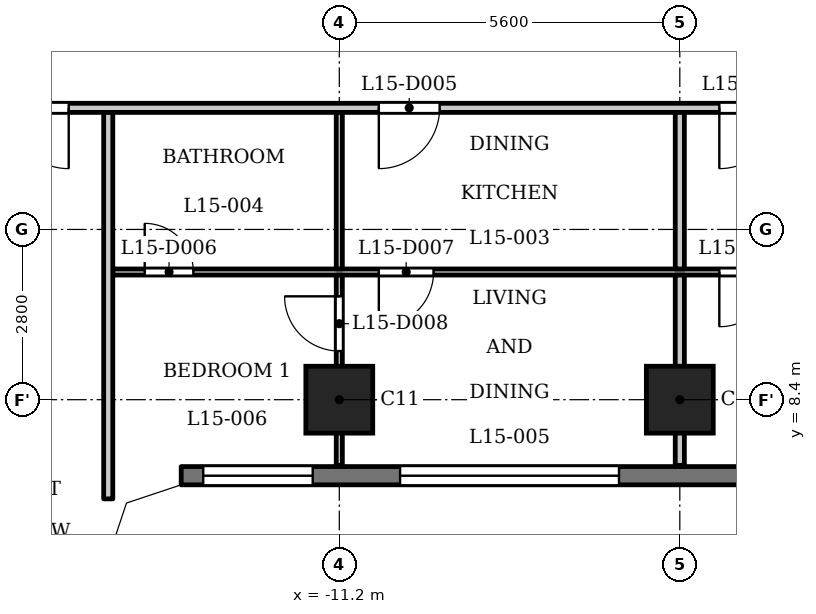
"""IFC4 building model, lengths in metres.
Left out: names, types, materials, properties, quantities, classifications, styles, units other than length and angle.
Written with IfcOpenShell. Run it as: python <this file> out.ifc"""

import sys

from ifc_helpers import new_model, si_unit, direction, frame, frame_2d, origin, origin_2d, place, context, subcontext, project, spatial, polyline, rectangle, outline, extrude, element, fill, save


model = new_model("IFC4")
c1 = context("Model", 3, precision=1e-05, world=origin(), true_north=direction((0.0, 1.0)))
c2 = subcontext(c1, "Body", "Model", "MODEL_VIEW")
j1 = project(units=[si_unit("LENGTHUNIT", "METRE"), si_unit("PLANEANGLEUNIT", "RADIAN")], contexts=[c1])
p1 = place(None, origin())
s1 = spatial("IfcSite", under=j1, at=p1, CompositionType="ELEMENT")
p2 = place(p1, origin())
s2 = spatial("IfcBuilding", under=s1, at=p2, CompositionType="ELEMENT")
p3 = place(p2, frame((0.0, 0.0, 62.0)))
s3 = spatial("IfcBuildingStorey", under=s2, at=p3, CompositionType="ELEMENT", Elevation=62.0)
for number, where, z_axis, x_axis in (
    (1, (-11.2, 8.4, 0.0), (0.0, 0.0, 1.0), (1.0, 0.0, 0.0)),
    (2, (-5.6, 8.4, 0.0), (0.0, 0.0, 1.0), (1.0, 0.0, 0.0)),
):
    element("IfcColumn", number, at=place(p3, frame(where, z_axis=z_axis, x_axis=x_axis)), inside=s3, PredefinedType="COLUMN", context=c2, shape_type="SweptSolid", body=[
        extrude(rectangle(XDim=1.1, YDim=1.1, at=origin_2d()), origin(), (0.0, 0.0, 1.0), 3.5),
    ])
p4 = place(p3, frame((-13.8, 7.15, 0.0), z_axis=(0.0, 0.0, 1.0), x_axis=(1.0, 0.0, 0.0)))
e3 = element("IfcWall", 3, at=p4, inside=s3, PredefinedType="SOLIDWALL", context=c2, shape_type="SweptSolid", body=[
    extrude(rectangle(XDim=27.6, YDim=0.3, at=frame_2d((13.8, 0.0))), origin(), (0.0, 0.0, 1.0), 3.2),
])
p5 = place(p4, frame((0.363, 0.0, 0.9)))
e4 = element("IfcOpeningElement", 4, at=p5, cuts=e3, PredefinedType="OPENING", context=c2, shape_type="SweptSolid", body=[
    extrude(rectangle(XDim=1.8, YDim=1.25, at=frame_2d((0.9, 0.625))), frame((0.0, 0.16, 0.0), z_axis=(0.0, -1.0, 0.0), x_axis=(1.0, 0.0, 0.0)), (0.0, 0.0, 1.0), 0.32),
])
p6 = place(p4, frame((3.6, 0.0, 1.2)))
e5 = element("IfcOpeningElement", 5, at=p6, cuts=e3, PredefinedType="OPENING", context=c2, shape_type="SweptSolid", body=[
    extrude(rectangle(XDim=3.6, YDim=0.95, at=frame_2d((1.8, 0.475))), frame((0.0, 0.16, 0.0), z_axis=(0.0, -1.0, 0.0), x_axis=(1.0, 0.0, 0.0)), (0.0, 0.0, 1.0), 0.32),
])
p7 = place(p4, frame((9.2, 0.0, 1.2)))
e6 = element("IfcOpeningElement", 6, at=p7, cuts=e3, PredefinedType="OPENING", context=c2, shape_type="SweptSolid", body=[
    extrude(rectangle(XDim=3.6, YDim=0.95, at=frame_2d((1.8, 0.475))), frame((0.0, 0.16, 0.0), z_axis=(0.0, -1.0, 0.0), x_axis=(1.0, 0.0, 0.0)), (0.0, 0.0, 1.0), 0.32),
])
p8 = place(p4, frame((14.8, 0.0, 1.2)))
e7 = element("IfcOpeningElement", 7, at=p8, cuts=e3, PredefinedType="OPENING", context=c2, shape_type="SweptSolid", body=[
    extrude(rectangle(XDim=3.6, YDim=0.95, at=frame_2d((1.8, 0.475))), frame((0.0, 0.16, 0.0), z_axis=(0.0, -1.0, 0.0), x_axis=(1.0, 0.0, 0.0)), (0.0, 0.0, 1.0), 0.32),
])
p9 = place(p4, frame((20.4, 0.0, 1.2)))
e8 = element("IfcOpeningElement", 8, at=p9, cuts=e3, PredefinedType="OPENING", context=c2, shape_type="SweptSolid", body=[
    extrude(rectangle(XDim=3.6, YDim=0.95, at=frame_2d((1.8, 0.475))), frame((0.0, 0.16, 0.0), z_axis=(0.0, -1.0, 0.0), x_axis=(1.0, 0.0, 0.0)), (0.0, 0.0, 1.0), 0.32),
])
p10 = place(p4, frame((25.438, 0.0, 0.9)))
e9 = element("IfcOpeningElement", 9, at=p10, cuts=e3, PredefinedType="OPENING", context=c2, shape_type="SweptSolid", body=[
    extrude(rectangle(XDim=1.8, YDim=1.25, at=frame_2d((0.9, 0.625))), frame((0.0, 0.16, 0.0), z_axis=(0.0, -1.0, 0.0), x_axis=(1.0, 0.0, 0.0)), (0.0, 0.0, 1.0), 0.32),
])
p11 = place(p3, frame((-14.925, 10.5, 0.0), z_axis=(0.0, 0.0, 1.0), x_axis=(1.0, 0.0, 0.0)))
e10 = element("IfcWall", 10, at=p11, inside=s3, PredefinedType="PARTITIONING", context=c2, shape_type="SweptSolid", body=[
    extrude(rectangle(XDim=29.85, YDim=0.1, at=frame_2d((14.925, 0.0))), origin(), (0.0, 0.0, 1.0), 3.2),
])
p12 = place(p11, frame((0.525, 0.0, 0.0)))
e11 = element("IfcOpeningElement", 11, at=p12, cuts=e10, PredefinedType="OPENING", context=c2, shape_type="SweptSolid", body=[
    extrude(rectangle(XDim=0.8, YDim=2.1, at=frame_2d((0.4, 1.05))), frame((0.0, 0.06, 0.0), z_axis=(0.0, -1.0, 0.0), x_axis=(1.0, 0.0, 0.0)), (0.0, 0.0, 1.0), 0.12),
])
p13 = place(p11, frame((4.375, 0.0, 0.0)))
e12 = element("IfcOpeningElement", 12, at=p13, cuts=e10, PredefinedType="OPENING", context=c2, shape_type="SweptSolid", body=[
    extrude(rectangle(XDim=0.9, YDim=2.1, at=frame_2d((0.45, 1.05))), frame((0.0, 0.06, 0.0), z_axis=(0.0, -1.0, 0.0), x_axis=(1.0, 0.0, 0.0)), (0.0, 0.0, 1.0), 0.12),
])
p14 = place(p11, frame((15.575, 0.0, 0.0)))
e13 = element("IfcOpeningElement", 13, at=p14, cuts=e10, PredefinedType="OPENING", context=c2, shape_type="SweptSolid", body=[
    extrude(rectangle(XDim=0.8, YDim=2.1, at=frame_2d((0.4, 1.05))), frame((0.0, 0.06, 0.0), z_axis=(0.0, -1.0, 0.0), x_axis=(1.0, 0.0, 0.0)), (0.0, 0.0, 1.0), 0.12),
])
p15 = place(p11, frame((9.975, 0.0, 0.0)))
e14 = element("IfcOpeningElement", 14, at=p15, cuts=e10, PredefinedType="OPENING", context=c2, shape_type="SweptSolid", body=[
    extrude(rectangle(XDim=0.9, YDim=2.1, at=frame_2d((0.45, 1.05))), frame((0.0, 0.06, 0.0), z_axis=(0.0, -1.0, 0.0), x_axis=(1.0, 0.0, 0.0)), (0.0, 0.0, 1.0), 0.12),
])
p16 = place(p11, frame((26.725, 0.0, 0.0)))
e15 = element("IfcOpeningElement", 15, at=p16, cuts=e10, PredefinedType="OPENING", context=c2, shape_type="SweptSolid", body=[
    extrude(rectangle(XDim=0.8, YDim=2.1, at=frame_2d((0.4, 1.05))), frame((0.0, 0.06, 0.0), z_axis=(0.0, -1.0, 0.0), x_axis=(1.0, 0.0, 0.0)), (0.0, 0.0, 1.0), 0.12),
])
p17 = place(p11, frame((21.175, 0.0, 0.0)))
e16 = element("IfcOpeningElement", 16, at=p17, cuts=e10, PredefinedType="OPENING", context=c2, shape_type="SweptSolid", body=[
    extrude(rectangle(XDim=0.9, YDim=2.1, at=frame_2d((0.45, 1.05))), frame((0.0, 0.06, 0.0), z_axis=(0.0, -1.0, 0.0), x_axis=(1.0, 0.0, 0.0)), (0.0, 0.0, 1.0), 0.12),
])
p18 = place(p3, frame((-17.4, 13.2, 0.0), z_axis=(0.0, 0.0, 1.0), x_axis=(1.0, 0.0, 0.0)))
e17 = element("IfcWall", 17, at=p18, inside=s3, PredefinedType="PARTITIONING", context=c2, shape_type="SweptSolid", body=[
    extrude(rectangle(XDim=34.8, YDim=0.15, at=frame_2d((17.4, 0.0))), origin(), (0.0, 0.0, 1.0), 3.2),
])
p19 = place(p18, frame((0.75, 0.0, 0.0)))
e18 = element("IfcOpeningElement", 18, at=p19, cuts=e17, PredefinedType="OPENING", context=c2, shape_type="SweptSolid", body=[
    extrude(rectangle(XDim=1.0, YDim=2.1, at=frame_2d((0.5, 1.05))), frame((0.0, 0.085, 0.0), z_axis=(0.0, -1.0, 0.0), x_axis=(1.0, 0.0, 0.0)), (0.0, 0.0, 1.0), 0.17),
])
p20 = place(p18, frame((33.15, 0.0, 0.0)))
e19 = element("IfcOpeningElement", 19, at=p20, cuts=e17, PredefinedType="OPENING", context=c2, shape_type="SweptSolid", body=[
    extrude(rectangle(XDim=1.0, YDim=2.1, at=frame_2d((0.5, 1.05))), frame((0.0, 0.085, 0.0), z_axis=(0.0, -1.0, 0.0), x_axis=(1.0, 0.0, 0.0)), (0.0, 0.0, 1.0), 0.17),
])
p21 = place(p18, frame((6.85, 0.0, 0.0)))
e20 = element("IfcOpeningElement", 20, at=p21, cuts=e17, PredefinedType="OPENING", context=c2, shape_type="SweptSolid", body=[
    extrude(rectangle(XDim=1.0, YDim=2.1, at=frame_2d((0.5, 1.05))), frame((0.0, 0.085, 0.0), z_axis=(0.0, -1.0, 0.0), x_axis=(1.0, 0.0, 0.0)), (0.0, 0.0, 1.0), 0.17),
])
p22 = place(p18, frame((12.45, 0.0, 0.0)))
e21 = element("IfcOpeningElement", 21, at=p22, cuts=e17, PredefinedType="OPENING", context=c2, shape_type="SweptSolid", body=[
    extrude(rectangle(XDim=1.0, YDim=2.1, at=frame_2d((0.5, 1.05))), frame((0.0, 0.085, 0.0), z_axis=(0.0, -1.0, 0.0), x_axis=(1.0, 0.0, 0.0)), (0.0, 0.0, 1.0), 0.17),
])
p23 = place(p18, frame((23.65, 0.0, 0.0)))
e22 = element("IfcOpeningElement", 22, at=p23, cuts=e17, PredefinedType="OPENING", context=c2, shape_type="SweptSolid", body=[
    extrude(rectangle(XDim=1.0, YDim=2.1, at=frame_2d((0.5, 1.05))), frame((0.0, 0.085, 0.0), z_axis=(0.0, -1.0, 0.0), x_axis=(1.0, 0.0, 0.0)), (0.0, 0.0, 1.0), 0.17),
])
p24 = place(p3, frame((-15.0, 6.769, 0.0), z_axis=(0.0, 0.0, 1.0), x_axis=(0.0, 1.0, 0.0)))
e23 = element("IfcWall", 23, at=p24, inside=s3, PredefinedType="PARTITIONING", context=c2, shape_type="SweptSolid", body=[
    extrude(rectangle(XDim=6.356, YDim=0.15, at=frame_2d((3.178, 0.0))), origin(), (0.0, 0.0, 1.0), 3.2),
])
p25 = place(p3, frame((-11.2, 7.32, 0.0), z_axis=(0.0, 0.0, 1.0), x_axis=(0.0, 1.0, 0.0)))
e24 = element("IfcWall", 24, at=p25, inside=s3, PredefinedType="PARTITIONING", context=c2, shape_type="SweptSolid", body=[
    extrude(rectangle(XDim=3.13, YDim=0.1, at=frame_2d((1.565, 0.0))), origin(), (0.0, 0.0, 1.0), 3.2),
])
p26 = place(p25, frame((1.88, 0.0, 0.0)))
e25 = element("IfcOpeningElement", 25, at=p26, cuts=e24, PredefinedType="OPENING", context=c2, shape_type="SweptSolid", body=[
    extrude(rectangle(XDim=0.9, YDim=2.1, at=frame_2d((0.45, 1.05))), frame((0.0, 0.06, 0.0), z_axis=(0.0, -1.0, 0.0), x_axis=(1.0, 0.0, 0.0)), (0.0, 0.0, 1.0), 0.12),
])
p27 = place(p3, frame((-11.2, 10.55, 0.0), z_axis=(0.0, 0.0, 1.0), x_axis=(0.0, 1.0, 0.0)))
e26 = element("IfcWall", 26, at=p27, inside=s3, PredefinedType="PARTITIONING", context=c2, shape_type="SweptSolid", body=[
    extrude(rectangle(XDim=2.575, YDim=0.1, at=frame_2d((1.288, 0.0))), origin(), (0.0, 0.0, 1.0), 3.2),
])
p28 = place(p3, frame((-5.6, 7.32, 0.0), z_axis=(0.0, 0.0, 1.0), x_axis=(0.0, 1.0, 0.0)))
e27 = element("IfcWall", 27, at=p28, inside=s3, PredefinedType="PARTITIONING", context=c2, shape_type="SweptSolid", body=[
    extrude(rectangle(XDim=3.13, YDim=0.15, at=frame_2d((1.565, 0.0))), origin(), (0.0, 0.0, 1.0), 3.2),
])
p29 = place(p3, frame((-5.6, 10.55, 0.0), z_axis=(0.0, 0.0, 1.0), x_axis=(0.0, 1.0, 0.0)))
e28 = element("IfcWall", 28, at=p29, inside=s3, PredefinedType="PARTITIONING", context=c2, shape_type="SweptSolid", body=[
    extrude(rectangle(XDim=2.575, YDim=0.15, at=frame_2d((1.288, 0.0))), origin(), (0.0, 0.0, 1.0), 3.2),
])
p30 = place(p3, origin())
e29 = element("IfcWall", 29, at=p30, inside=s3, PredefinedType="SOLIDWALL", context=c2, shape_type="SweptSolid", body=[
    extrude(outline(polyline([(-13.849, 7.3), (-14.937, 6.937), (-15.3, 5.849), (-15.3, 5.8), (-15.0, 5.8), (-14.7, 6.7), (-13.8, 7.0), (-13.8, 7.3), (-13.849, 7.3)])), origin(), (0.0, 0.0, 1.0), 3.2),
])
p31 = place(p19, origin())
e30 = element("IfcDoor", 30, at=p31, inside=s3, OperationType="SINGLE_SWING_RIGHT", PredefinedType="DOOR", context=c2, shape_type="SweptSolid", body=[
    extrude(rectangle(XDim=1.0, YDim=2.1, at=frame_2d((0.5, 1.05))), frame((0.0, 0.025, 0.0), z_axis=(0.0, -1.0, 0.0), x_axis=(1.0, 0.0, 0.0)), (0.0, 0.0, 1.0), 0.05),
])
fill(e18, e30)
p32 = place(p21, origin())
e31 = element("IfcDoor", 31, at=p32, inside=s3, OperationType="SINGLE_SWING_LEFT", PredefinedType="DOOR", context=c2, shape_type="SweptSolid", body=[
    extrude(rectangle(XDim=1.0, YDim=2.1, at=frame_2d((0.5, 1.05))), frame((0.0, 0.025, 0.0), z_axis=(0.0, -1.0, 0.0), x_axis=(1.0, 0.0, 0.0)), (0.0, 0.0, 1.0), 0.05),
])
fill(e20, e31)
p33 = place(p12, origin())
e32 = element("IfcDoor", 32, at=p33, inside=s3, OperationType="SINGLE_SWING_RIGHT", PredefinedType="DOOR", context=c2, shape_type="SweptSolid", body=[
    extrude(rectangle(XDim=0.8, YDim=2.1, at=frame_2d((0.4, 1.05))), frame((0.0, 0.025, 0.0), z_axis=(0.0, -1.0, 0.0), x_axis=(1.0, 0.0, 0.0)), (0.0, 0.0, 1.0), 0.05),
])
fill(e11, e32)
p34 = place(p13, origin())
e33 = element("IfcDoor", 33, at=p34, inside=s3, OperationType="SINGLE_SWING_LEFT", PredefinedType="DOOR", context=c2, shape_type="SweptSolid", body=[
    extrude(rectangle(XDim=0.9, YDim=2.1, at=frame_2d((0.45, 1.05))), frame((0.0, 0.025, 0.0), z_axis=(0.0, -1.0, 0.0), x_axis=(1.0, 0.0, 0.0)), (0.0, 0.0, 1.0), 0.05),
])
fill(e12, e33)
p35 = place(p26, origin())
e34 = element("IfcDoor", 34, at=p35, inside=s3, OperationType="SINGLE_SWING_LEFT", PredefinedType="DOOR", context=c2, shape_type="SweptSolid", body=[
    extrude(rectangle(XDim=0.9, YDim=2.1, at=frame_2d((0.45, 1.05))), frame((0.0, 0.025, 0.0), z_axis=(0.0, -1.0, 0.0), x_axis=(1.0, 0.0, 0.0)), (0.0, 0.0, 1.0), 0.05),
])
fill(e25, e34)
p36 = place(p22, origin())
e35 = element("IfcDoor", 35, at=p36, inside=s3, OperationType="SINGLE_SWING_LEFT", PredefinedType="DOOR", context=c2, shape_type="SweptSolid", body=[
    extrude(rectangle(XDim=1.0, YDim=2.1, at=frame_2d((0.5, 1.05))), frame((0.0, 0.025, 0.0), z_axis=(0.0, -1.0, 0.0), x_axis=(1.0, 0.0, 0.0)), (0.0, 0.0, 1.0), 0.05),
])
fill(e21, e35)
p37 = place(p15, origin())
e36 = element("IfcDoor", 36, at=p37, inside=s3, OperationType="SINGLE_SWING_LEFT", PredefinedType="DOOR", context=c2, shape_type="SweptSolid", body=[
    extrude(rectangle(XDim=0.9, YDim=2.1, at=frame_2d((0.45, 1.05))), frame((0.0, 0.025, 0.0), z_axis=(0.0, -1.0, 0.0), x_axis=(1.0, 0.0, 0.0)), (0.0, 0.0, 1.0), 0.05),
])
fill(e14, e36)
p38 = place(p5, origin())
e37 = element("IfcWindow", 37, at=p38, inside=s3, PartitioningType="SINGLE_PANEL", PredefinedType="WINDOW", context=c2, shape_type="SweptSolid", body=[
    extrude(rectangle(XDim=1.8, YDim=1.25, at=frame_2d((0.9, 0.625))), frame((0.0, 0.03, 0.0), z_axis=(0.0, -1.0, 0.0), x_axis=(1.0, 0.0, 0.0)), (0.0, 0.0, 1.0), 0.06),
])
fill(e4, e37)
p39 = place(p6, origin())
e38 = element("IfcWindow", 38, at=p39, inside=s3, PartitioningType="SINGLE_PANEL", PredefinedType="WINDOW", context=c2, shape_type="SweptSolid", body=[
    extrude(rectangle(XDim=3.6, YDim=0.95, at=frame_2d((1.8, 0.475))), frame((0.0, 0.03, 0.0), z_axis=(0.0, -1.0, 0.0), x_axis=(1.0, 0.0, 0.0)), (0.0, 0.0, 1.0), 0.06),
])
fill(e5, e38)
save(model, sys.argv[1])
